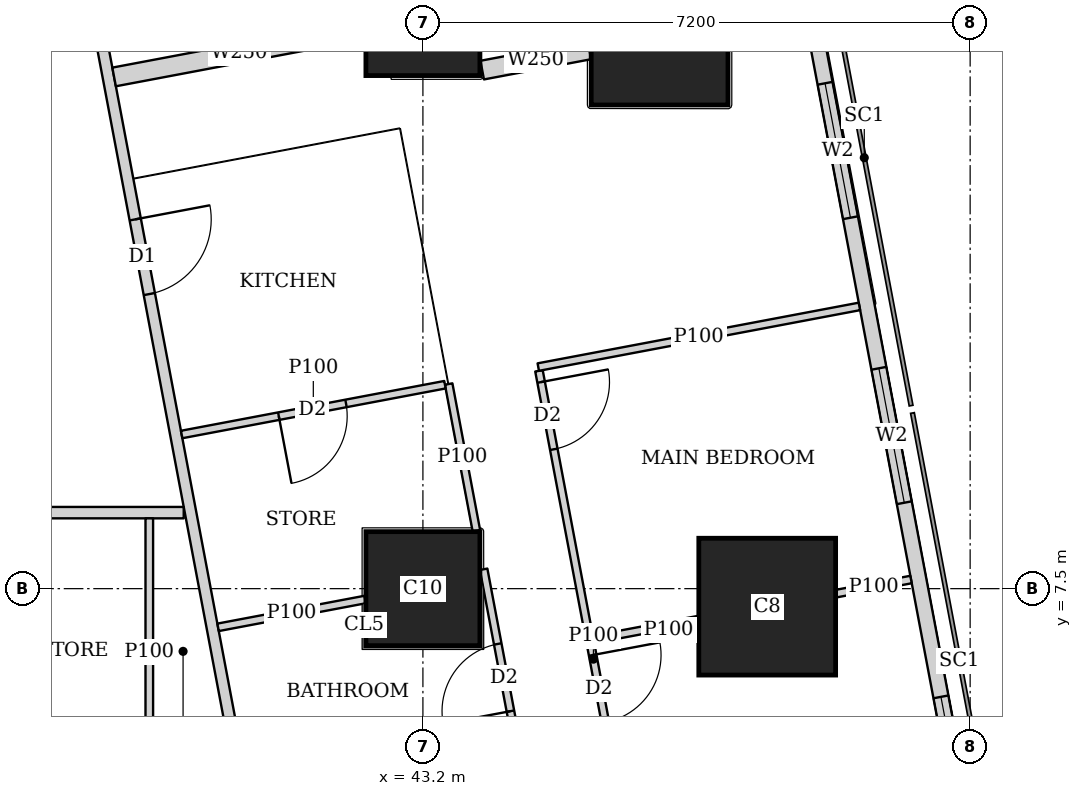
"""IFC4 building model, lengths in metres.
Left out: names, types, materials, properties, quantities, classifications, styles, units other than length and angle.
Written with IfcOpenShell. Run it as: python <this file> out.ifc"""

import sys

from ifc_helpers import new_model, si_unit, direction, frame, frame_2d, origin, origin_2d, place, context, subcontext, project, spatial, rectangle, extrude, element, fill, save


model = new_model("IFC4")
c1 = context("Model", 3, precision=1e-05, world=origin(), true_north=direction((0.0, 1.0)))
c2 = subcontext(c1, "Body", "Model", "MODEL_VIEW")
j1 = project(units=[si_unit("LENGTHUNIT", "METRE"), si_unit("PLANEANGLEUNIT", "RADIAN")], contexts=[c1])
p1 = place(None, origin())
s1 = spatial("IfcSite", under=j1, at=p1, CompositionType="ELEMENT")
p2 = place(p1, origin())
s2 = spatial("IfcBuilding", under=s1, at=p2, CompositionType="ELEMENT")
p3 = place(p2, frame((0.0, 0.0, 180.8)))
s3 = spatial("IfcBuildingStorey", under=s2, at=p3, CompositionType="ELEMENT", Elevation=180.8)
p4 = place(p3, frame((43.2, 7.5, 0.0), z_axis=(0.0, 0.0, 1.0), x_axis=(1.0, 0.0, 0.0)))
e1 = element("IfcColumn", 1, at=p4, inside=s3, PredefinedType="COLUMN", context=c2, shape_type="SweptSolid", body=[
    extrude(rectangle(XDim=1.5, YDim=1.5, at=origin_2d()), origin(), (0.0, 0.0, 1.0), 3.75),
])
p5 = place(p3, frame((47.73, 7.263, 0.0), z_axis=(0.0, 0.0, 1.0), x_axis=(1.0, 0.0, 0.0)))
e2 = element("IfcColumn", 2, at=p5, inside=s3, PredefinedType="COLUMN", context=c2, shape_type="SweptSolid", body=[
    extrude(rectangle(XDim=1.8, YDim=1.8, at=origin_2d()), origin(), (0.0, 0.0, 1.0), 3.75),
])
p6 = place(p3, frame((43.2, 15.0, 0.0), z_axis=(0.0, 0.0, 1.0), x_axis=(1.0, 0.0, 0.0)))
e3 = element("IfcColumn", 3, at=p6, inside=s3, PredefinedType="COLUMN", context=c2, shape_type="SweptSolid", body=[
    extrude(rectangle(XDim=1.5, YDim=1.5, at=origin_2d()), origin(), (0.0, 0.0, 1.0), 3.75),
])
p7 = place(p3, frame((46.314, 14.763, 0.0), z_axis=(0.0, 0.0, 1.0), x_axis=(1.0, 0.0, 0.0)))
e4 = element("IfcColumn", 4, at=p7, inside=s3, PredefinedType="COLUMN", context=c2, shape_type="SweptSolid", body=[
    extrude(rectangle(XDim=1.8, YDim=1.8, at=origin_2d()), origin(), (0.0, 0.0, 1.0), 3.75),
])
p8 = place(p3, frame((50.653, 2.703, 0.0), z_axis=(0.0, 0.0, 1.0), x_axis=(-0.185612026696, 0.982623109613, 0.0)))
e5 = element("IfcWall", 5, at=p8, inside=s3, PredefinedType="SOLIDWALL", context=c2, shape_type="SweptSolid", body=[
    extrude(rectangle(XDim=41.393, YDim=0.2, at=frame_2d((20.697, 0.0))), origin(), (0.0, 0.0, 1.0), 3.5),
])
p9 = place(p8, frame((1.633, 0.0, 0.9)))
e6 = element("IfcOpeningElement", 6, at=p9, cuts=e5, PredefinedType="OPENING", context=c2, shape_type="SweptSolid", body=[
    extrude(rectangle(XDim=1.8, YDim=1.5, at=frame_2d((0.9, 0.75))), frame((0.0, 0.11, 0.0), z_axis=(0.0, -1.0, 0.0), x_axis=(1.0, 0.0, 0.0)), (0.0, 0.0, 1.0), 0.22),
])
p10 = place(p8, frame((6.032, 0.0, 0.9)))
e7 = element("IfcOpeningElement", 7, at=p10, cuts=e5, PredefinedType="OPENING", context=c2, shape_type="SweptSolid", body=[
    extrude(rectangle(XDim=1.8, YDim=1.5, at=frame_2d((0.9, 0.75))), frame((0.0, 0.11, 0.0), z_axis=(0.0, -1.0, 0.0), x_axis=(1.0, 0.0, 0.0)), (0.0, 0.0, 1.0), 0.22),
])
p11 = place(p8, frame((9.848, 0.0, 0.9)))
e8 = element("IfcOpeningElement", 8, at=p11, cuts=e5, PredefinedType="OPENING", context=c2, shape_type="SweptSolid", body=[
    extrude(rectangle(XDim=1.8, YDim=1.5, at=frame_2d((0.9, 0.75))), frame((0.0, 0.11, 0.0), z_axis=(0.0, -1.0, 0.0), x_axis=(1.0, 0.0, 0.0)), (0.0, 0.0, 1.0), 0.22),
])
p12 = place(p8, frame((13.664, 0.0, 0.9)))
e9 = element("IfcOpeningElement", 9, at=p12, cuts=e5, PredefinedType="OPENING", context=c2, shape_type="SweptSolid", body=[
    extrude(rectangle(XDim=1.8, YDim=1.5, at=frame_2d((0.9, 0.75))), frame((0.0, 0.11, 0.0), z_axis=(0.0, -1.0, 0.0), x_axis=(1.0, 0.0, 0.0)), (0.0, 0.0, 1.0), 0.22),
])
p13 = place(p8, frame((17.481, 0.0, 0.9)))
e10 = element("IfcOpeningElement", 10, at=p13, cuts=e5, PredefinedType="OPENING", context=c2, shape_type="SweptSolid", body=[
    extrude(rectangle(XDim=1.8, YDim=1.5, at=frame_2d((0.9, 0.75))), frame((0.0, 0.11, 0.0), z_axis=(0.0, -1.0, 0.0), x_axis=(1.0, 0.0, 0.0)), (0.0, 0.0, 1.0), 0.22),
])
p14 = place(p8, frame((21.297, 0.0, 0.9)))
e11 = element("IfcOpeningElement", 11, at=p14, cuts=e5, PredefinedType="OPENING", context=c2, shape_type="SweptSolid", body=[
    extrude(rectangle(XDim=1.8, YDim=1.5, at=frame_2d((0.9, 0.75))), frame((0.0, 0.11, 0.0), z_axis=(0.0, -1.0, 0.0), x_axis=(1.0, 0.0, 0.0)), (0.0, 0.0, 1.0), 0.22),
])
p15 = place(p8, frame((25.113, 0.0, 0.9)))
e12 = element("IfcOpeningElement", 12, at=p15, cuts=e5, PredefinedType="OPENING", context=c2, shape_type="SweptSolid", body=[
    extrude(rectangle(XDim=1.8, YDim=1.5, at=frame_2d((0.9, 0.75))), frame((0.0, 0.11, 0.0), z_axis=(0.0, -1.0, 0.0), x_axis=(1.0, 0.0, 0.0)), (0.0, 0.0, 1.0), 0.22),
])
p16 = place(p8, frame((28.93, 0.0, 0.9)))
e13 = element("IfcOpeningElement", 13, at=p16, cuts=e5, PredefinedType="OPENING", context=c2, shape_type="SweptSolid", body=[
    extrude(rectangle(XDim=1.8, YDim=1.5, at=frame_2d((0.9, 0.75))), frame((0.0, 0.11, 0.0), z_axis=(0.0, -1.0, 0.0), x_axis=(1.0, 0.0, 0.0)), (0.0, 0.0, 1.0), 0.22),
])
p17 = place(p8, frame((32.746, 0.0, 0.9)))
e14 = element("IfcOpeningElement", 14, at=p17, cuts=e5, PredefinedType="OPENING", context=c2, shape_type="SweptSolid", body=[
    extrude(rectangle(XDim=1.8, YDim=1.5, at=frame_2d((0.9, 0.75))), frame((0.0, 0.11, 0.0), z_axis=(0.0, -1.0, 0.0), x_axis=(1.0, 0.0, 0.0)), (0.0, 0.0, 1.0), 0.22),
])
p18 = place(p8, frame((36.481, 0.0, 0.9)))
e15 = element("IfcOpeningElement", 15, at=p18, cuts=e5, PredefinedType="OPENING", context=c2, shape_type="SweptSolid", body=[
    extrude(rectangle(XDim=1.8, YDim=1.5, at=frame_2d((0.9, 0.75))), frame((0.0, 0.11, 0.0), z_axis=(0.0, -1.0, 0.0), x_axis=(1.0, 0.0, 0.0)), (0.0, 0.0, 1.0), 0.22),
])
p19 = place(p3, frame((40.053, 8.5, 0.0), z_axis=(0.0, 0.0, 1.0), x_axis=(-1.0, 0.0, 0.0)))
e16 = element("IfcWall", 16, at=p19, inside=s3, PredefinedType="SOLIDWALL", context=c2, shape_type="SweptSolid", body=[
    extrude(rectangle(XDim=31.703, YDim=0.15, at=frame_2d((15.852, 0.0))), origin(), (0.0, 0.0, 1.0), 3.5),
])
p20 = place(p19, frame((28.103, 0.0, 0.0)))
e17 = element("IfcOpeningElement", 17, at=p20, cuts=e16, PredefinedType="OPENING", context=c2, shape_type="SweptSolid", body=[
    extrude(rectangle(XDim=1.0, YDim=2.1, at=frame_2d((0.5, 1.05))), frame((0.0, 0.085, 0.0), z_axis=(0.0, -1.0, 0.0), x_axis=(1.0, 0.0, 0.0)), (0.0, 0.0, 1.0), 0.17),
])
p21 = place(p19, frame((15.953, 0.0, 0.0)))
e18 = element("IfcOpeningElement", 18, at=p21, cuts=e16, PredefinedType="OPENING", context=c2, shape_type="SweptSolid", body=[
    extrude(rectangle(XDim=1.0, YDim=2.1, at=frame_2d((0.5, 1.05))), frame((0.0, 0.085, 0.0), z_axis=(0.0, -1.0, 0.0), x_axis=(1.0, 0.0, 0.0)), (0.0, 0.0, 1.0), 0.17),
])
p22 = place(p19, frame((8.753, 0.0, 0.0)))
e19 = element("IfcOpeningElement", 19, at=p22, cuts=e16, PredefinedType="OPENING", context=c2, shape_type="SweptSolid", body=[
    extrude(rectangle(XDim=1.0, YDim=2.1, at=frame_2d((0.5, 1.05))), frame((0.0, 0.085, 0.0), z_axis=(0.0, -1.0, 0.0), x_axis=(1.0, 0.0, 0.0)), (0.0, 0.0, 1.0), 0.17),
])
p23 = place(p3, frame((33.623, 43.022, 0.0), z_axis=(0.0, 0.0, 1.0), x_axis=(0.185596841028, -0.98262597798, 0.0)))
e20 = element("IfcWall", 20, at=p23, inside=s3, PredefinedType="SOLIDWALL", context=c2, shape_type="SweptSolid", body=[
    extrude(rectangle(XDim=41.66, YDim=0.15, at=frame_2d((20.83, 0.0))), origin(), (0.0, 0.0, 1.0), 2.5),
])
p24 = place(p23, frame((8.034, 0.0, 0.0)))
e21 = element("IfcOpeningElement", 21, at=p24, cuts=e20, PredefinedType="OPENING", context=c2, shape_type="SweptSolid", body=[
    extrude(rectangle(XDim=1.0, YDim=2.1, at=frame_2d((0.5, 1.05))), frame((0.0, 0.085, 0.0), z_axis=(0.0, -1.0, 0.0), x_axis=(1.0, 0.0, 0.0)), (0.0, 0.0, 1.0), 0.17),
])
p25 = place(p23, frame((12.611, 0.0, 0.0)))
e22 = element("IfcOpeningElement", 22, at=p25, cuts=e20, PredefinedType="OPENING", context=c2, shape_type="SweptSolid", body=[
    extrude(rectangle(XDim=1.0, YDim=2.1, at=frame_2d((0.5, 1.05))), frame((0.0, 0.085, 0.0), z_axis=(0.0, -1.0, 0.0), x_axis=(1.0, 0.0, 0.0)), (0.0, 0.0, 1.0), 0.17),
])
p26 = place(p23, frame((20.242, 0.0, 0.0)))
e23 = element("IfcOpeningElement", 23, at=p26, cuts=e20, PredefinedType="OPENING", context=c2, shape_type="SweptSolid", body=[
    extrude(rectangle(XDim=1.0, YDim=2.1, at=frame_2d((0.5, 1.05))), frame((0.0, 0.085, 0.0), z_axis=(0.0, -1.0, 0.0), x_axis=(1.0, 0.0, 0.0)), (0.0, 0.0, 1.0), 0.17),
])
p27 = place(p23, frame((31.206, 0.0, 0.0)))
e24 = element("IfcOpeningElement", 24, at=p27, cuts=e20, PredefinedType="OPENING", context=c2, shape_type="SweptSolid", body=[
    extrude(rectangle(XDim=1.0, YDim=2.1, at=frame_2d((0.5, 1.05))), frame((0.0, 0.085, 0.0), z_axis=(0.0, -1.0, 0.0), x_axis=(1.0, 0.0, 0.0)), (0.0, 0.0, 1.0), 0.17),
])
p28 = place(p3, frame((39.6, 4.9, 0.0), z_axis=(0.0, 0.0, 1.0), x_axis=(0.0, 1.0, 0.0)))
e25 = element("IfcWall", 25, at=p28, inside=s3, PredefinedType="PARTITIONING", context=c2, shape_type="SweptSolid", body=[
    extrude(rectangle(XDim=3.525, YDim=0.1, at=frame_2d((1.763, 0.0))), origin(), (0.0, 0.0, 1.0), 3.5),
])
p29 = place(p3, frame((44.727, 10.366, 0.0), z_axis=(0.0, 0.0, 1.0), x_axis=(0.185578957652, -0.982629355595, 0.0)))
e26 = element("IfcWall", 26, at=p29, inside=s3, PredefinedType="PARTITIONING", context=c2, shape_type="SweptSolid", body=[
    extrude(rectangle(XDim=7.721, YDim=0.1, at=frame_2d((3.86, 0.0))), origin(), (0.0, 0.0, 1.0), 3.5),
])
p30 = place(p29, frame((0.151, 0.0, 0.0)))
e27 = element("IfcOpeningElement", 27, at=p30, cuts=e26, PredefinedType="OPENING", context=c2, shape_type="SweptSolid", body=[
    extrude(rectangle(XDim=0.9, YDim=2.1, at=frame_2d((0.45, 1.05))), frame((0.0, 0.06, 0.0), z_axis=(0.0, -1.0, 0.0), x_axis=(1.0, 0.0, 0.0)), (0.0, 0.0, 1.0), 0.12),
])
p31 = place(p29, frame((3.806, 0.0, 0.0)))
e28 = element("IfcOpeningElement", 28, at=p31, cuts=e26, PredefinedType="OPENING", context=c2, shape_type="SweptSolid", body=[
    extrude(rectangle(XDim=0.9, YDim=2.1, at=frame_2d((0.45, 1.05))), frame((0.0, 0.06, 0.0), z_axis=(0.0, -1.0, 0.0), x_axis=(1.0, 0.0, 0.0)), (0.0, 0.0, 1.0), 0.12),
])
p32 = place(p3, frame((43.539, 10.192, 0.0), z_axis=(0.0, 0.0, 1.0), x_axis=(0.18564540894, -0.982616803306, 0.0)))
e29 = element("IfcWall", 29, at=p32, inside=s3, PredefinedType="PARTITIONING", context=c2, shape_type="SweptSolid", body=[
    extrude(rectangle(XDim=1.966, YDim=0.1, at=frame_2d((0.983, 0.0))), origin(), (0.0, 0.0, 1.0), 3.5),
])
p33 = place(p3, frame((43.999, 7.755, 0.0), z_axis=(0.0, 0.0, 1.0), x_axis=(0.185565904578, -0.982631820703, 0.0)))
e30 = element("IfcWall", 30, at=p33, inside=s3, PredefinedType="PARTITIONING", context=c2, shape_type="SweptSolid", body=[
    extrude(rectangle(XDim=5.319, YDim=0.1, at=frame_2d((2.66, 0.0))), origin(), (0.0, 0.0, 1.0), 3.5),
])
p34 = place(p33, frame((1.0, 0.0, 0.0)))
e31 = element("IfcOpeningElement", 31, at=p34, cuts=e30, PredefinedType="OPENING", context=c2, shape_type="SweptSolid", body=[
    extrude(rectangle(XDim=0.9, YDim=2.1, at=frame_2d((0.45, 1.05))), frame((0.0, 0.06, 0.0), z_axis=(0.0, -1.0, 0.0), x_axis=(1.0, 0.0, 0.0)), (0.0, 0.0, 1.0), 0.12),
])
p35 = place(p33, frame((4.269, 0.0, 0.0)))
e32 = element("IfcOpeningElement", 32, at=p35, cuts=e30, PredefinedType="OPENING", context=c2, shape_type="SweptSolid", body=[
    extrude(rectangle(XDim=0.9, YDim=2.1, at=frame_2d((0.45, 1.05))), frame((0.0, 0.06, 0.0), z_axis=(0.0, -1.0, 0.0), x_axis=(1.0, 0.0, 0.0)), (0.0, 0.0, 1.0), 0.12),
])
p36 = place(p33, frame((2.585, 0.0, 0.0)))
e33 = element("IfcOpeningElement", 33, at=p36, cuts=e30, PredefinedType="OPENING", context=c2, shape_type="SweptSolid", body=[
    extrude(rectangle(XDim=0.9, YDim=2.1, at=frame_2d((0.45, 1.05))), frame((0.0, 0.06, 0.0), z_axis=(0.0, -1.0, 0.0), x_axis=(1.0, 0.0, 0.0)), (0.0, 0.0, 1.0), 0.12),
])
p37 = place(p3, frame((48.943, 11.213, 0.0), z_axis=(0.0, 0.0, 1.0), x_axis=(-0.982633535512, -0.185556823879, 0.0)))
e34 = element("IfcWall", 34, at=p37, inside=s3, PredefinedType="PARTITIONING", context=c2, shape_type="SweptSolid", body=[
    extrude(rectangle(XDim=4.3, YDim=0.1, at=frame_2d((2.15, 0.0))), origin(), (0.0, 0.0, 1.0), 2.1),
])
p38 = place(p3, frame((49.622, 7.62, 0.0), z_axis=(0.0, 0.0, 1.0), x_axis=(-0.982708646087, -0.185158626332, 0.0)))
e35 = element("IfcWall", 35, at=p38, inside=s3, PredefinedType="PARTITIONING", context=c2, shape_type="SweptSolid", body=[
    extrude(rectangle(XDim=1.0, YDim=0.1, at=frame_2d((0.5, 0.0))), origin(), (0.0, 0.0, 1.0), 3.5),
])
p39 = place(p3, frame((46.82, 7.091, 0.0), z_axis=(0.0, 0.0, 1.0), x_axis=(-0.982689853246, -0.185258339427, 0.0)))
e36 = element("IfcWall", 36, at=p39, inside=s3, PredefinedType="PARTITIONING", context=c2, shape_type="SweptSolid", body=[
    extrude(rectangle(XDim=1.398, YDim=0.1, at=frame_2d((0.699, 0.0))), origin(), (0.0, 0.0, 1.0), 3.5),
])
p40 = place(p3, frame((43.49, 10.183, 0.0), z_axis=(0.0, 0.0, 1.0), x_axis=(-0.982588017646, -0.185797706064, 0.0)))
e37 = element("IfcWall", 37, at=p40, inside=s3, PredefinedType="PARTITIONING", context=c2, shape_type="SweptSolid", body=[
    extrude(rectangle(XDim=3.525, YDim=0.1, at=frame_2d((1.763, 0.0))), origin(), (0.0, 0.0, 1.0), 3.5),
])
p41 = place(p40, frame((1.325, 0.0, 0.0)))
e38 = element("IfcOpeningElement", 38, at=p41, cuts=e37, PredefinedType="OPENING", context=c2, shape_type="SweptSolid", body=[
    extrude(rectangle(XDim=0.9, YDim=2.1, at=frame_2d((0.45, 1.05))), frame((0.0, 0.06, 0.0), z_axis=(0.0, -1.0, 0.0), x_axis=(1.0, 0.0, 0.0)), (0.0, 0.0, 1.0), 0.12),
])
p42 = place(p3, frame((42.44, 7.357, 0.0), z_axis=(0.0, 0.0, 1.0), x_axis=(-0.982581871375, -0.185830207569, 0.0)))
e39 = element("IfcWall", 39, at=p42, inside=s3, PredefinedType="PARTITIONING", context=c2, shape_type="SweptSolid", body=[
    extrude(rectangle(XDim=1.969, YDim=0.1, at=frame_2d((0.985, 0.0))), origin(), (0.0, 0.0, 1.0), 3.5),
])
p43 = place(p3, frame((45.39, 14.588, 0.0), z_axis=(0.0, 0.0, 1.0), x_axis=(-0.982680951688, -0.18530555089, 0.0)))
e40 = element("IfcWall", 40, at=p43, inside=s3, PredefinedType="SOLIDWALL", context=c2, shape_type="SweptSolid", body=[
    extrude(rectangle(XDim=1.435, YDim=0.25, at=frame_2d((0.717, 0.0))), origin(), (0.0, 0.0, 1.0), 2.1),
])
p44 = place(p3, frame((42.426, 14.853, 0.0), z_axis=(0.0, 0.0, 1.0), x_axis=(-0.982633560103, -0.185556693654, 0.0)))
e41 = element("IfcWall", 41, at=p44, inside=s3, PredefinedType="SOLIDWALL", context=c2, shape_type="SweptSolid", body=[
    extrude(rectangle(XDim=3.347, YDim=0.25, at=frame_2d((1.674, 0.0))), origin(), (0.0, 0.0, 1.0), 3.5),
])
p45 = place(p9, origin())
e42 = element("IfcWindow", 42, at=p45, inside=s3, PartitioningType="SINGLE_PANEL", PredefinedType="WINDOW", context=c2, shape_type="SweptSolid", body=[
    extrude(rectangle(XDim=1.8, YDim=1.5, at=frame_2d((0.9, 0.75))), frame((0.0, 0.03, 0.0), z_axis=(0.0, -1.0, 0.0), x_axis=(1.0, 0.0, 0.0)), (0.0, 0.0, 1.0), 0.06),
])
fill(e6, e42)
p46 = place(p10, origin())
e43 = element("IfcWindow", 43, at=p46, inside=s3, PartitioningType="SINGLE_PANEL", PredefinedType="WINDOW", context=c2, shape_type="SweptSolid", body=[
    extrude(rectangle(XDim=1.8, YDim=1.5, at=frame_2d((0.9, 0.75))), frame((0.0, 0.03, 0.0), z_axis=(0.0, -1.0, 0.0), x_axis=(1.0, 0.0, 0.0)), (0.0, 0.0, 1.0), 0.06),
])
fill(e7, e43)
p47 = place(p11, origin())
e44 = element("IfcWindow", 44, at=p47, inside=s3, PartitioningType="SINGLE_PANEL", PredefinedType="WINDOW", context=c2, shape_type="SweptSolid", body=[
    extrude(rectangle(XDim=1.8, YDim=1.5, at=frame_2d((0.9, 0.75))), frame((0.0, 0.03, 0.0), z_axis=(0.0, -1.0, 0.0), x_axis=(1.0, 0.0, 0.0)), (0.0, 0.0, 1.0), 0.06),
])
fill(e8, e44)
p48 = place(p30, origin())
e45 = element("IfcDoor", 45, at=p48, inside=s3, OperationType="SINGLE_SWING_LEFT", PredefinedType="DOOR", context=c2, shape_type="SweptSolid", body=[
    extrude(rectangle(XDim=0.9, YDim=2.1, at=frame_2d((0.45, 1.05))), frame((0.0, 0.025, 0.0), z_axis=(0.0, -1.0, 0.0), x_axis=(1.0, 0.0, 0.0)), (0.0, 0.0, 1.0), 0.05),
])
fill(e27, e45)
p49 = place(p31, origin())
e46 = element("IfcDoor", 46, at=p49, inside=s3, OperationType="SINGLE_SWING_LEFT", PredefinedType="DOOR", context=c2, shape_type="SweptSolid", body=[
    extrude(rectangle(XDim=0.9, YDim=2.1, at=frame_2d((0.45, 1.05))), frame((0.0, 0.025, 0.0), z_axis=(0.0, -1.0, 0.0), x_axis=(1.0, 0.0, 0.0)), (0.0, 0.0, 1.0), 0.05),
])
fill(e28, e46)
p50 = place(p34, origin())
e47 = element("IfcDoor", 47, at=p50, inside=s3, OperationType="SINGLE_SWING_LEFT", PredefinedType="DOOR", context=c2, shape_type="SweptSolid", body=[
    extrude(rectangle(XDim=0.9, YDim=2.1, at=frame_2d((0.45, 1.05))), frame((0.0, 0.025, 0.0), z_axis=(0.0, -1.0, 0.0), x_axis=(1.0, 0.0, 0.0)), (0.0, 0.0, 1.0), 0.05),
])
fill(e31, e47)
p51 = place(p27, origin())
e48 = element("IfcDoor", 48, at=p51, inside=s3, OperationType="SINGLE_SWING_LEFT", PredefinedType="DOOR", context=c2, shape_type="SweptSolid", body=[
    extrude(rectangle(XDim=1.0, YDim=2.1, at=frame_2d((0.5, 1.05))), frame((0.0, 0.025, 0.0), z_axis=(0.0, -1.0, 0.0), x_axis=(1.0, 0.0, 0.0)), (0.0, 0.0, 1.0), 0.05),
])
fill(e24, e48)
p52 = place(p41, origin())
e49 = element("IfcDoor", 49, at=p52, inside=s3, OperationType="SINGLE_SWING_RIGHT", PredefinedType="DOOR", context=c2, shape_type="SweptSolid", body=[
    extrude(rectangle(XDim=0.9, YDim=2.1, at=frame_2d((0.45, 1.05))), frame((0.0, 0.025, 0.0), z_axis=(0.0, -1.0, 0.0), x_axis=(1.0, 0.0, 0.0)), (0.0, 0.0, 1.0), 0.05),
])
fill(e38, e49)
save(model, sys.argv[1])
